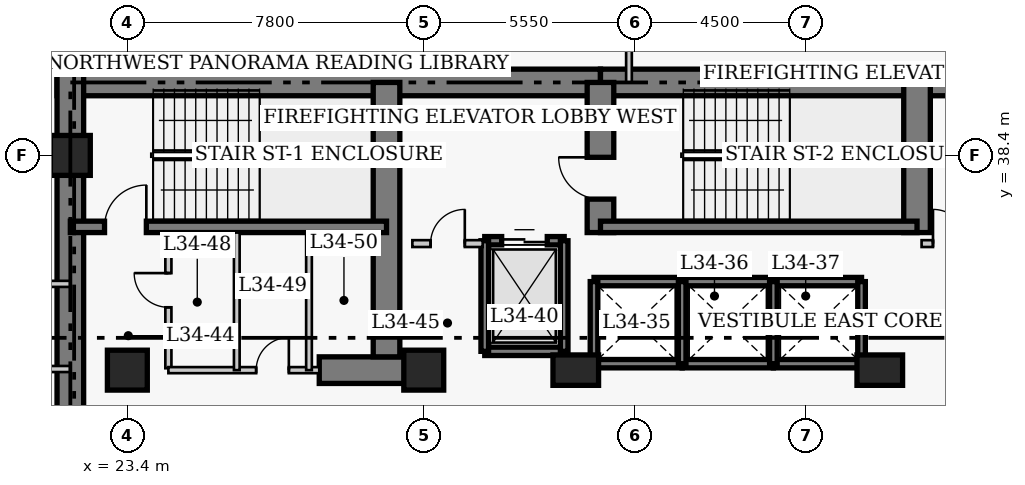
"""IFC4 building model, lengths in metres.
Left out: names, types, materials, properties, quantities, classifications, styles, units other than length and angle.
Written with IfcOpenShell. Run it as: python <this file> out.ifc"""

import sys

from ifc_helpers import new_model, si_unit, direction, frame, frame_2d, origin, origin_2d, place, context, subcontext, project, spatial, rectangle, extrude, element, fill, save


model = new_model("IFC4")
c1 = context("Model", 3, precision=1e-05, world=origin(), true_north=direction((0.0, 1.0)))
c2 = subcontext(c1, "Body", "Model", "MODEL_VIEW")
j1 = project(units=[si_unit("LENGTHUNIT", "METRE"), si_unit("PLANEANGLEUNIT", "RADIAN")], contexts=[c1])
p1 = place(None, origin())
s1 = spatial("IfcSite", under=j1, at=p1, CompositionType="ELEMENT")
p2 = place(p1, origin())
s2 = spatial("IfcBuilding", under=s1, at=p2, CompositionType="ELEMENT")
p3 = place(p2, frame((0.0, 0.0, 138.4)))
s3 = spatial("IfcBuildingStorey", under=s2, at=p3, CompositionType="ELEMENT", Elevation=138.4)
p4 = place(p3, frame((21.55, 40.32, 0.0), z_axis=(0.0, 0.0, 1.0), x_axis=(1.0, 0.0, 0.0)))
e1 = element("IfcWall", 1, at=p4, inside=s3, PredefinedType="SHEAR", context=c2, shape_type="SweptSolid", body=[
    extrude(rectangle(XDim=14.3, YDim=0.7, at=frame_2d((7.15, 0.0))), origin(), (0.0, 0.0, 1.0), 3.8),
])
p5 = place(p3, frame((35.85, 40.32, 0.0), z_axis=(0.0, 0.0, 1.0), x_axis=(1.0, 0.0, 0.0)))
e2 = element("IfcWall", 2, at=p5, inside=s3, PredefinedType="SHEAR", context=c2, shape_type="SweptSolid", body=[
    extrude(rectangle(XDim=12.6, YDim=0.7, at=frame_2d((6.3, 0.0))), origin(), (0.0, 0.0, 1.0), 3.8),
])
p6 = place(p3, frame((21.9, 27.05, 0.0), z_axis=(0.0, 0.0, 1.0), x_axis=(0.0, 1.0, 0.0)))
e3 = element("IfcWall", 3, at=p6, inside=s3, PredefinedType="SHEAR", context=c2, shape_type="SweptSolid", body=[
    extrude(rectangle(XDim=13.62, YDim=0.7, at=frame_2d((6.81, 0.0))), origin(), (0.0, 0.0, 1.0), 3.8),
])
p7 = place(p3, frame((28.45, 32.75, 0.0), z_axis=(0.0, 0.0, 1.0), x_axis=(1.0, 0.0, 0.0)))
e4 = element("IfcWall", 4, at=p7, inside=s3, PredefinedType="SHEAR", context=c2, shape_type="SweptSolid", body=[
    extrude(rectangle(XDim=2.4, YDim=0.7, at=frame_2d((1.2, 0.0))), origin(), (0.0, 0.0, 1.0), 3.8),
])
p8 = place(p3, frame((30.22, 33.1, 0.0), z_axis=(0.0, 0.0, 1.0), x_axis=(0.0, 1.0, 0.0)))
e5 = element("IfcWall", 5, at=p8, inside=s3, PredefinedType="SHEAR", context=c2, shape_type="SweptSolid", body=[
    extrude(rectangle(XDim=7.22, YDim=0.7, at=frame_2d((3.61, 0.0))), origin(), (0.0, 0.0, 1.0), 3.8),
])
p9 = place(p3, frame((35.85, 36.37, 0.0), z_axis=(0.0, 0.0, 1.0), x_axis=(0.0, 1.0, 0.0)))
e6 = element("IfcWall", 6, at=p9, inside=s3, PredefinedType="SHEAR", context=c2, shape_type="SweptSolid", body=[
    extrude(rectangle(XDim=3.95, YDim=0.7, at=frame_2d((1.975, 0.0))), origin(), (0.0, 0.0, 1.0), 3.8),
])
p10 = place(p9, frame((0.88, 0.0, 0.0)))
e7 = element("IfcOpeningElement", 7, at=p10, cuts=e6, PredefinedType="OPENING", context=c2, shape_type="SweptSolid", body=[
    extrude(rectangle(XDim=1.1, YDim=2.15, at=frame_2d((0.55, 1.075))), frame((0.0, 0.36, 0.0), z_axis=(0.0, -1.0, 0.0), x_axis=(1.0, 0.0, 0.0)), (0.0, 0.0, 1.0), 0.72),
])
p11 = place(p3, frame((44.18, 36.37, 0.0), z_axis=(0.0, 0.0, 1.0), x_axis=(0.0, 1.0, 0.0)))
e8 = element("IfcWall", 8, at=p11, inside=s3, PredefinedType="SHEAR", context=c2, shape_type="SweptSolid", body=[
    extrude(rectangle(XDim=3.95, YDim=0.7, at=frame_2d((1.975, 0.0))), origin(), (0.0, 0.0, 1.0), 3.8),
])
p12 = place(p3, frame((21.9, 36.52, 0.0), z_axis=(0.0, 0.0, 1.0), x_axis=(1.0, 0.0, 0.0)))
e9 = element("IfcWall", 9, at=p12, inside=s3, PredefinedType="SHEAR", context=c2, shape_type="SweptSolid", body=[
    extrude(rectangle(XDim=8.32, YDim=0.3, at=frame_2d((4.16, 0.0))), origin(), (0.0, 0.0, 1.0), 3.8),
])
p13 = place(p12, frame((0.9, 0.0, 0.0)))
e10 = element("IfcOpeningElement", 10, at=p13, cuts=e9, PredefinedType="OPENING", context=c2, shape_type="SweptSolid", body=[
    extrude(rectangle(XDim=1.1, YDim=2.15, at=frame_2d((0.55, 1.075))), frame((0.0, 0.16, 0.0), z_axis=(0.0, -1.0, 0.0), x_axis=(1.0, 0.0, 0.0)), (0.0, 0.0, 1.0), 0.32),
])
p14 = place(p3, frame((35.85, 36.52, 0.0), z_axis=(0.0, 0.0, 1.0), x_axis=(1.0, 0.0, 0.0)))
e11 = element("IfcWall", 11, at=p14, inside=s3, PredefinedType="SHEAR", context=c2, shape_type="SweptSolid", body=[
    extrude(rectangle(XDim=8.33, YDim=0.3, at=frame_2d((4.165, 0.0))), origin(), (0.0, 0.0, 1.0), 3.8),
])
for number, where, z_axis, x_axis in (
    (12, (21.9, 38.4, 0.0), (0.0, 0.0, 1.0), (1.0, 0.0, 0.0)),
    (13, (23.4, 32.75, 0.0), (0.0, 0.0, 1.0), (1.0, 0.0, 0.0)),
    (14, (31.2, 32.75, 0.0), (0.0, 0.0, 1.0), (1.0, 0.0, 0.0)),
):
    element("IfcColumn", number, at=place(p3, frame(where, z_axis=z_axis, x_axis=x_axis)), inside=s3, PredefinedType="COLUMN", context=c2, shape_type="SweptSolid", body=[
        extrude(rectangle(XDim=1.05, YDim=1.05, at=origin_2d()), origin(), (0.0, 0.0, 1.0), 3.8),
    ])
for number, where, z_axis, x_axis in (
    (15, (35.2, 32.75, 0.0), (0.0, 0.0, 1.0), (1.0, 0.0, 0.0)),
    (16, (43.2, 32.75, 0.0), (0.0, 0.0, 1.0), (1.0, 0.0, 0.0)),
):
    element("IfcColumn", number, at=place(p3, frame(where, z_axis=z_axis, x_axis=x_axis)), inside=s3, PredefinedType="COLUMN", context=c2, shape_type="SweptSolid", body=[
        extrude(rectangle(XDim=1.2, YDim=0.8, at=origin_2d()), origin(), (0.0, 0.0, 1.0), 3.8),
    ])
for number, where, z_axis, x_axis in (
    (17, (35.68, 35.08, 0.0), (0.0, 0.0, 1.0), (1.0, 0.0, 0.0)),
    (18, (35.68, 32.92, 0.0), (0.0, 0.0, 1.0), (1.0, 0.0, 0.0)),
):
    element("IfcWall", number, at=place(p3, frame(where, z_axis=z_axis, x_axis=x_axis)), inside=s3, PredefinedType="SHEAR", context=c2, shape_type="SweptSolid", body=[
        extrude(rectangle(XDim=2.32, YDim=0.22, at=frame_2d((1.16, 0.0))), origin(), (0.0, 0.0, 1.0), 3.8),
    ])
p15 = place(p3, frame((35.68, 32.92, 0.0), z_axis=(0.0, 0.0, 1.0), x_axis=(0.0, 1.0, 0.0)))
e19 = element("IfcWall", 19, at=p15, inside=s3, PredefinedType="SHEAR", context=c2, shape_type="SweptSolid", body=[
    extrude(rectangle(XDim=2.16, YDim=0.2, at=frame_2d((1.08, 0.0))), origin(), (0.0, 0.0, 1.0), 3.8),
])
for number, where, z_axis, x_axis in (
    (20, (38.0, 35.08, 0.0), (0.0, 0.0, 1.0), (1.0, 0.0, 0.0)),
    (21, (38.0, 32.92, 0.0), (0.0, 0.0, 1.0), (1.0, 0.0, 0.0)),
):
    element("IfcWall", number, at=place(p3, frame(where, z_axis=z_axis, x_axis=x_axis)), inside=s3, PredefinedType="SHEAR", context=c2, shape_type="SweptSolid", body=[
        extrude(rectangle(XDim=2.4, YDim=0.22, at=frame_2d((1.2, 0.0))), origin(), (0.0, 0.0, 1.0), 3.8),
    ])
p16 = place(p3, frame((38.0, 32.92, 0.0), z_axis=(0.0, 0.0, 1.0), x_axis=(0.0, 1.0, 0.0)))
e22 = element("IfcWall", 22, at=p16, inside=s3, PredefinedType="SHEAR", context=c2, shape_type="SweptSolid", body=[
    extrude(rectangle(XDim=2.16, YDim=0.2, at=frame_2d((1.08, 0.0))), origin(), (0.0, 0.0, 1.0), 3.8),
])
for number, where, z_axis, x_axis in (
    (23, (40.4, 35.08, 0.0), (0.0, 0.0, 1.0), (1.0, 0.0, 0.0)),
    (24, (40.4, 32.92, 0.0), (0.0, 0.0, 1.0), (1.0, 0.0, 0.0)),
):
    element("IfcWall", number, at=place(p3, frame(where, z_axis=z_axis, x_axis=x_axis)), inside=s3, PredefinedType="SHEAR", context=c2, shape_type="SweptSolid", body=[
        extrude(rectangle(XDim=2.32, YDim=0.22, at=frame_2d((1.16, 0.0))), origin(), (0.0, 0.0, 1.0), 3.8),
    ])
for number, where, z_axis, x_axis in (
    (25, (40.4, 32.92, 0.0), (0.0, 0.0, 1.0), (0.0, 1.0, 0.0)),
    (26, (42.72, 32.92, 0.0), (0.0, 0.0, 1.0), (0.0, 1.0, 0.0)),
):
    element("IfcWall", number, at=place(p3, frame(where, z_axis=z_axis, x_axis=x_axis)), inside=s3, PredefinedType="SHEAR", context=c2, shape_type="SweptSolid", body=[
        extrude(rectangle(XDim=2.16, YDim=0.2, at=frame_2d((1.08, 0.0))), origin(), (0.0, 0.0, 1.0), 3.8),
    ])
p17 = place(p3, frame((32.805, 36.155, 0.0), z_axis=(0.0, 0.0, 1.0), x_axis=(1.0, 0.0, 0.0)))
e27 = element("IfcWall", 27, at=p17, inside=s3, PredefinedType="SHEAR", context=c2, shape_type="SweptSolid", body=[
    extrude(rectangle(XDim=2.09, YDim=0.22, at=frame_2d((1.045, 0.0))), origin(), (0.0, 0.0, 1.0), 3.8),
])
p18 = place(p17, frame((0.445, 0.0, 0.0)))
e28 = element("IfcOpeningElement", 28, at=p18, cuts=e27, PredefinedType="OPENING", context=c2, shape_type="SweptSolid", body=[
    extrude(rectangle(XDim=1.2, YDim=2.15, at=frame_2d((0.6, 1.075))), frame((0.0, 0.12, 0.0), z_axis=(0.0, -1.0, 0.0), x_axis=(1.0, 0.0, 0.0)), (0.0, 0.0, 1.0), 0.24),
])
p19 = place(p3, frame((32.805, 33.245, 0.0), z_axis=(0.0, 0.0, 1.0), x_axis=(1.0, 0.0, 0.0)))
e29 = element("IfcWall", 29, at=p19, inside=s3, PredefinedType="SHEAR", context=c2, shape_type="SweptSolid", body=[
    extrude(rectangle(XDim=2.09, YDim=0.22, at=frame_2d((1.045, 0.0))), origin(), (0.0, 0.0, 1.0), 3.8),
])
for number, where, z_axis, x_axis in (
    (30, (32.805, 33.245, 0.0), (0.0, 0.0, 1.0), (0.0, 1.0, 0.0)),
    (31, (34.895, 33.245, 0.0), (0.0, 0.0, 1.0), (0.0, 1.0, 0.0)),
):
    element("IfcWall", number, at=place(p3, frame(where, z_axis=z_axis, x_axis=x_axis)), inside=s3, PredefinedType="SHEAR", context=c2, shape_type="SweptSolid", body=[
        extrude(rectangle(XDim=2.91, YDim=0.2, at=frame_2d((1.455, 0.0))), origin(), (0.0, 0.0, 1.0), 3.8),
    ])
p20 = place(p3, frame((30.9, 36.08, 0.0), z_axis=(0.0, 0.0, 1.0), x_axis=(1.0, 0.0, 0.0)))
e32 = element("IfcWall", 32, at=p20, inside=s3, PredefinedType="PARTITIONING", context=c2, shape_type="SweptSolid", body=[
    extrude(rectangle(XDim=1.85, YDim=0.18, at=frame_2d((0.925, 0.0))), origin(), (0.0, 0.0, 1.0), 3.55),
])
p21 = place(p20, frame((0.48, 0.0, 0.0)))
e33 = element("IfcOpeningElement", 33, at=p21, cuts=e32, PredefinedType="OPENING", context=c2, shape_type="SweptSolid", body=[
    extrude(rectangle(XDim=0.9, YDim=2.15, at=frame_2d((0.45, 1.075))), frame((0.0, 0.1, 0.0), z_axis=(0.0, -1.0, 0.0), x_axis=(1.0, 0.0, 0.0)), (0.0, 0.0, 1.0), 0.2),
])
p22 = place(p3, frame((44.3, 36.08, 0.0), z_axis=(0.0, 0.0, 1.0), x_axis=(1.0, 0.0, 0.0)))
e34 = element("IfcWall", 34, at=p22, inside=s3, PredefinedType="PARTITIONING", context=c2, shape_type="SweptSolid", body=[
    extrude(rectangle(XDim=1.5, YDim=0.18, at=frame_2d((0.75, 0.0))), origin(), (0.0, 0.0, 1.0), 3.55),
])
p23 = place(p22, frame((0.3, 0.0, 0.0)))
e35 = element("IfcOpeningElement", 35, at=p23, cuts=e34, PredefinedType="OPENING", context=c2, shape_type="SweptSolid", body=[
    extrude(rectangle(XDim=0.9, YDim=2.15, at=frame_2d((0.45, 1.075))), frame((0.0, 0.1, 0.0), z_axis=(0.0, -1.0, 0.0), x_axis=(1.0, 0.0, 0.0)), (0.0, 0.0, 1.0), 0.2),
])
p24 = place(p3, frame((24.48, 32.8, 0.0), z_axis=(0.0, 0.0, 1.0), x_axis=(0.0, 1.0, 0.0)))
e36 = element("IfcWall", 36, at=p24, inside=s3, PredefinedType="PARTITIONING", context=c2, shape_type="SweptSolid", body=[
    extrude(rectangle(XDim=3.57, YDim=0.16, at=frame_2d((1.785, 0.0))), origin(), (0.0, 0.0, 1.0), 3.55),
])
p25 = place(p24, frame((1.604, 0.0, 0.0)))
e37 = element("IfcOpeningElement", 37, at=p25, cuts=e36, PredefinedType="OPENING", context=c2, shape_type="SweptSolid", body=[
    extrude(rectangle(XDim=0.9, YDim=2.1, at=frame_2d((0.45, 1.05))), frame((0.0, 0.09, 0.0), z_axis=(0.0, -1.0, 0.0), x_axis=(1.0, 0.0, 0.0)), (0.0, 0.0, 1.0), 0.18),
])
p26 = place(p3, frame((24.48, 32.75, 0.0), z_axis=(0.0, 0.0, 1.0), x_axis=(1.0, 0.0, 0.0)))
e38 = element("IfcWall", 38, at=p26, inside=s3, PredefinedType="PARTITIONING", context=c2, shape_type="SweptSolid", body=[
    extrude(rectangle(XDim=3.97, YDim=0.16, at=frame_2d((1.985, 0.0))), origin(), (0.0, 0.0, 1.0), 3.55),
])
p27 = place(p26, frame((2.31, 0.0, 0.0)))
e39 = element("IfcOpeningElement", 39, at=p27, cuts=e38, PredefinedType="OPENING", context=c2, shape_type="SweptSolid", body=[
    extrude(rectangle(XDim=0.86, YDim=2.05, at=frame_2d((0.43, 1.025))), frame((0.0, 0.09, 0.0), z_axis=(0.0, -1.0, 0.0), x_axis=(1.0, 0.0, 0.0)), (0.0, 0.0, 1.0), 0.18),
])
for number, where, z_axis, x_axis in (
    (40, (26.28, 32.75, 0.0), (0.0, 0.0, 1.0), (0.0, 1.0, 0.0)),
    (41, (28.18, 32.75, 0.0), (0.0, 0.0, 1.0), (0.0, 1.0, 0.0)),
):
    element("IfcWall", number, at=place(p3, frame(where, z_axis=z_axis, x_axis=x_axis)), inside=s3, PredefinedType="PARTITIONING", context=c2, shape_type="SweptSolid", body=[
        extrude(rectangle(XDim=3.62, YDim=0.15, at=frame_2d((1.81, 0.0))), origin(), (0.0, 0.0, 1.0), 3.55),
    ])
for number, where, z_axis, x_axis in (
    (42, (19.16, 35.02, 0.0), (0.0, 0.0, 1.0), (1.0, 0.0, 0.0)),
    (43, (19.16, 32.78, 0.0), (0.0, 0.0, 1.0), (1.0, 0.0, 0.0)),
):
    element("IfcWall", number, at=place(p3, frame(where, z_axis=z_axis, x_axis=x_axis)), inside=s3, PredefinedType="PARTITIONING", context=c2, shape_type="SweptSolid", body=[
        extrude(rectangle(XDim=2.74, YDim=0.16, at=frame_2d((1.37, 0.0))), origin(), (0.0, 0.0, 1.0), 3.55),
    ])
p28 = place(p3, frame((16.94, 40.65, 0.0), z_axis=(0.0, 0.0, 1.0), x_axis=(1.0, 0.0, 0.0)))
e44 = element("IfcWall", 44, at=p28, inside=s3, PredefinedType="PARTITIONING", context=c2, shape_type="SweptSolid", body=[
    extrude(rectangle(XDim=5.16, YDim=0.15, at=frame_2d((2.58, 0.0))), origin(), (0.0, 0.0, 1.0), 3.55),
])
p29 = place(p28, frame((0.55, 0.0, 0.0)))
e45 = element("IfcOpeningElement", 45, at=p29, cuts=e44, PredefinedType="OPENING", context=c2, shape_type="SweptSolid", body=[
    extrude(rectangle(XDim=1.0, YDim=2.15, at=frame_2d((0.5, 1.075))), frame((0.0, 0.085, 0.0), z_axis=(0.0, -1.0, 0.0), x_axis=(1.0, 0.0, 0.0)), (0.0, 0.0, 1.0), 0.17),
])
p30 = place(p3, frame((36.6, 40.32, 0.0), z_axis=(0.0, 0.0, 1.0), x_axis=(0.0, 1.0, 0.0)))
e46 = element("IfcWall", 46, at=p30, inside=s3, PredefinedType="PARTITIONING", context=c2, shape_type="SweptSolid", body=[
    extrude(rectangle(XDim=1.845, YDim=0.15, at=frame_2d((0.922, 0.0))), origin(), (0.0, 0.0, 1.0), 3.55),
])
p31 = place(p18, origin())
e47 = element("IfcDoor", 47, at=p31, inside=s3, OperationType="DOUBLE_DOOR_SLIDING", PredefinedType="DOOR", context=c2, shape_type="SweptSolid", body=[
    extrude(rectangle(XDim=1.2, YDim=2.15, at=frame_2d((0.6, 1.075))), frame((0.0, 0.025, 0.0), z_axis=(0.0, -1.0, 0.0), x_axis=(1.0, 0.0, 0.0)), (0.0, 0.0, 1.0), 0.05),
])
fill(e28, e47)
p32 = place(p21, origin())
e48 = element("IfcDoor", 48, at=p32, inside=s3, OperationType="SINGLE_SWING_RIGHT", PredefinedType="DOOR", context=c2, shape_type="SweptSolid", body=[
    extrude(rectangle(XDim=0.9, YDim=2.15, at=frame_2d((0.45, 1.075))), frame((0.0, 0.025, 0.0), z_axis=(0.0, -1.0, 0.0), x_axis=(1.0, 0.0, 0.0)), (0.0, 0.0, 1.0), 0.05),
])
fill(e33, e48)
p33 = place(p23, origin())
e49 = element("IfcDoor", 49, at=p33, inside=s3, OperationType="SINGLE_SWING_LEFT", PredefinedType="DOOR", context=c2, shape_type="SweptSolid", body=[
    extrude(rectangle(XDim=0.9, YDim=2.15, at=frame_2d((0.45, 1.075))), frame((0.0, 0.025, 0.0), z_axis=(0.0, -1.0, 0.0), x_axis=(1.0, 0.0, 0.0)), (0.0, 0.0, 1.0), 0.05),
])
fill(e35, e49)
p34 = place(p25, origin())
e50 = element("IfcDoor", 50, at=p34, inside=s3, OperationType="SINGLE_SWING_RIGHT", PredefinedType="DOOR", context=c2, shape_type="SweptSolid", body=[
    extrude(rectangle(XDim=0.9, YDim=2.1, at=frame_2d((0.45, 1.05))), frame((0.0, 0.025, 0.0), z_axis=(0.0, -1.0, 0.0), x_axis=(1.0, 0.0, 0.0)), (0.0, 0.0, 1.0), 0.05),
])
fill(e37, e50)
p35 = place(p27, origin())
e51 = element("IfcDoor", 51, at=p35, inside=s3, OperationType="SINGLE_SWING_RIGHT", PredefinedType="DOOR", context=c2, shape_type="SweptSolid", body=[
    extrude(rectangle(XDim=0.86, YDim=2.05, at=frame_2d((0.43, 1.025))), frame((0.0, 0.025, 0.0), z_axis=(0.0, -1.0, 0.0), x_axis=(1.0, 0.0, 0.0)), (0.0, 0.0, 1.0), 0.05),
])
fill(e39, e51)
p36 = place(p13, origin())
e52 = element("IfcDoor", 52, at=p36, inside=s3, OperationType="SINGLE_SWING_RIGHT", PredefinedType="DOOR", context=c2, shape_type="SweptSolid", body=[
    extrude(rectangle(XDim=1.1, YDim=2.15, at=frame_2d((0.55, 1.075))), frame((0.0, 0.025, 0.0), z_axis=(0.0, -1.0, 0.0), x_axis=(1.0, 0.0, 0.0)), (0.0, 0.0, 1.0), 0.05),
])
fill(e10, e52)
p37 = place(p10, origin())
e53 = element("IfcDoor", 53, at=p37, inside=s3, OperationType="SINGLE_SWING_RIGHT", PredefinedType="DOOR", context=c2, shape_type="SweptSolid", body=[
    extrude(rectangle(XDim=1.1, YDim=2.15, at=frame_2d((0.55, 1.075))), frame((0.0, 0.025, 0.0), z_axis=(0.0, -1.0, 0.0), x_axis=(1.0, 0.0, 0.0)), (0.0, 0.0, 1.0), 0.05),
])
fill(e7, e53)
save(model, sys.argv[1])
